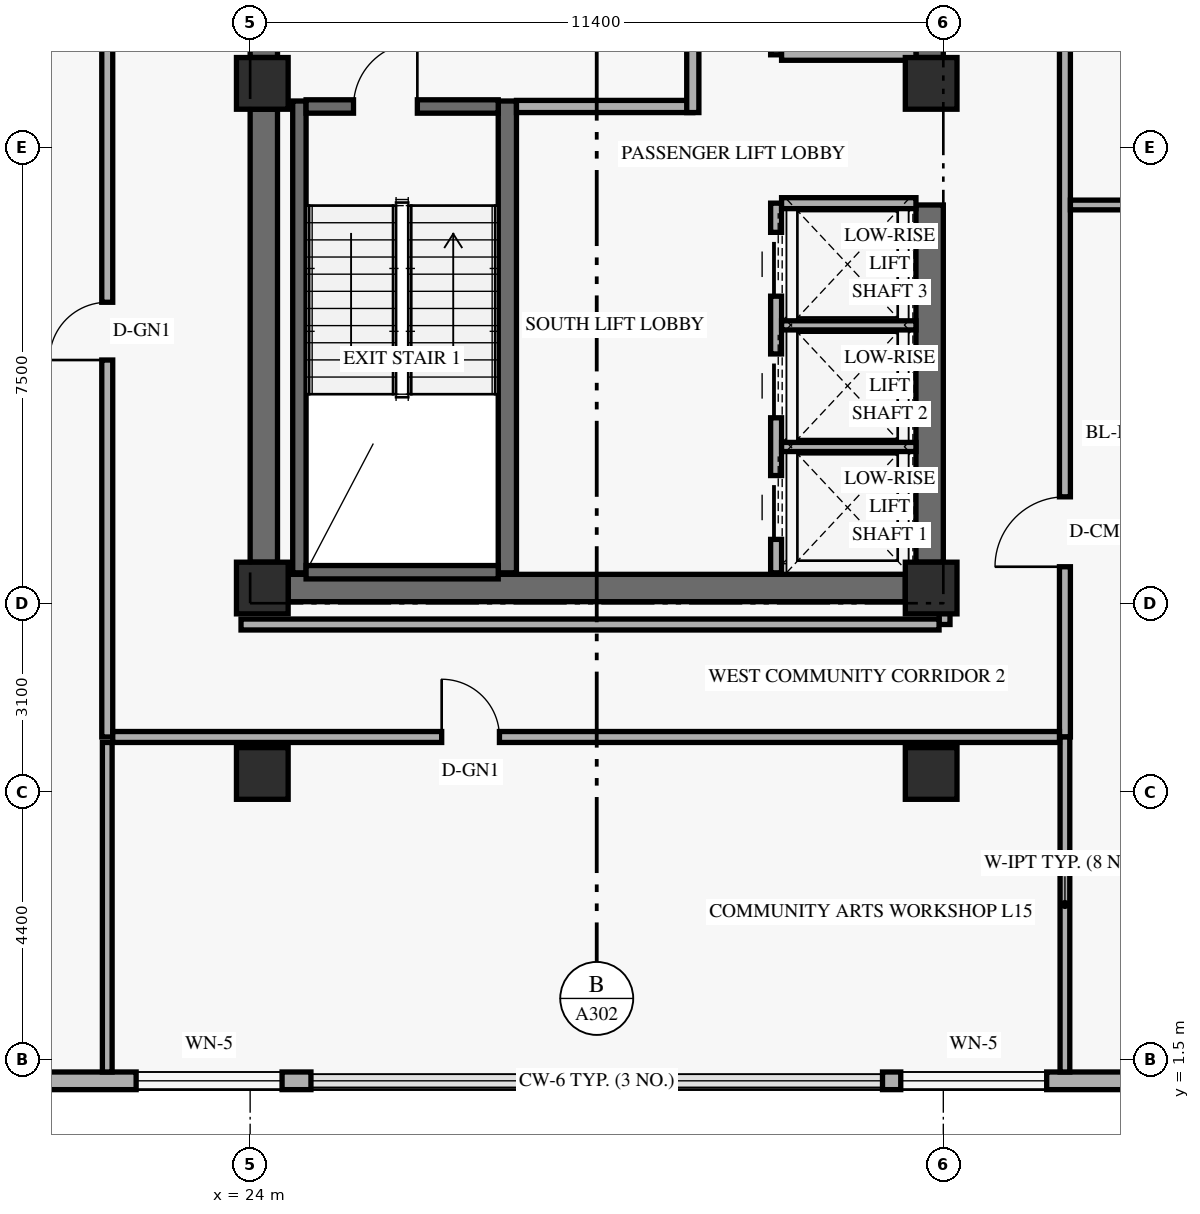
"""IFC4 building model, lengths in metres.
Left out: names, types, materials, properties, quantities, classifications, styles, units other than length and angle.
Written with IfcOpenShell. Run it as: python <this file> out.ifc"""

import sys

from ifc_helpers import new_model, si_unit, direction, frame, frame_2d, origin, origin_2d, place, context, subcontext, project, spatial, rectangle, extrude, element, fill, save


model = new_model("IFC4")
c1 = context("Model", 3, precision=1e-05, world=origin(), true_north=direction((0.0, 1.0)))
c2 = subcontext(c1, "Body", "Model", "MODEL_VIEW")
j1 = project(units=[si_unit("LENGTHUNIT", "METRE"), si_unit("PLANEANGLEUNIT", "RADIAN")], contexts=[c1])
p1 = place(None, origin())
s1 = spatial("IfcSite", under=j1, at=p1, CompositionType="ELEMENT")
p2 = place(p1, origin())
s2 = spatial("IfcBuilding", under=s1, at=p2, CompositionType="ELEMENT")
p3 = place(p2, frame((0.0, 0.0, 60.0)))
s3 = spatial("IfcBuildingStorey", under=s2, at=p3, CompositionType="ELEMENT", Elevation=60.0)
p4 = place(p3, frame((24.225, 9.675, 0.0), z_axis=(0.0, 0.0, 1.0), x_axis=(0.0, 1.0, 0.0)))
e1 = element("IfcWall", 1, at=p4, inside=s3, PredefinedType="SHEAR", context=c2, shape_type="SweptSolid", body=[
    extrude(rectangle(XDim=7.45, YDim=0.45, at=frame_2d((3.725, 0.0))), origin(), (0.0, 0.0, 1.0), 3.267),
])
p5 = place(p3, frame((24.225, 17.975, 0.0), z_axis=(0.0, 0.0, 1.0), x_axis=(0.0, 1.0, 0.0)))
e2 = element("IfcWall", 2, at=p5, inside=s3, PredefinedType="SHEAR", context=c2, shape_type="SweptSolid", body=[
    extrude(rectangle(XDim=11.8, YDim=0.45, at=frame_2d((5.9, 0.0))), origin(), (0.0, 0.0, 1.0), 3.267),
])
p6 = place(p3, frame((35.175, 9.675, 0.0), z_axis=(0.0, 0.0, 1.0), x_axis=(0.0, 1.0, 0.0)))
e3 = element("IfcWall", 3, at=p6, inside=s3, PredefinedType="SHEAR", context=c2, shape_type="SweptSolid", body=[
    extrude(rectangle(XDim=5.875, YDim=0.45, at=frame_2d((2.938, 0.0))), origin(), (0.0, 0.0, 1.0), 3.267),
])
p7 = place(p3, frame((35.175, 17.975, 0.0), z_axis=(0.0, 0.0, 1.0), x_axis=(0.0, 1.0, 0.0)))
e4 = element("IfcWall", 4, at=p7, inside=s3, PredefinedType="SHEAR", context=c2, shape_type="SweptSolid", body=[
    extrude(rectangle(XDim=10.125, YDim=0.45, at=frame_2d((5.062, 0.0))), origin(), (0.0, 0.0, 1.0), 3.267),
])
p8 = place(p3, frame((24.625, 9.25, 0.0), z_axis=(0.0, 0.0, 1.0), x_axis=(1.0, 0.0, 0.0)))
e5 = element("IfcWall", 5, at=p8, inside=s3, PredefinedType="SHEAR", context=c2, shape_type="SweptSolid", body=[
    extrude(rectangle(XDim=10.15, YDim=0.45, at=frame_2d((5.075, 0.0))), origin(), (0.0, 0.0, 1.0), 3.96),
])
p9 = place(p3, frame((24.81, 9.5, 0.0), z_axis=(0.0, 0.0, 1.0), x_axis=(0.0, 1.0, 0.0)))
e6 = element("IfcWall", 6, at=p9, inside=s3, PredefinedType="SHEAR", context=c2, shape_type="SweptSolid", body=[
    extrude(rectangle(XDim=7.76, YDim=0.22, at=frame_2d((3.88, 0.0))), origin(), (0.0, 0.0, 1.0), 3.96),
])
p10 = place(p3, frame((28.23, 9.5, 0.0), z_axis=(0.0, 0.0, 1.0), x_axis=(0.0, 1.0, 0.0)))
e7 = element("IfcWall", 7, at=p10, inside=s3, PredefinedType="SHEAR", context=c2, shape_type="SweptSolid", body=[
    extrude(rectangle(XDim=7.76, YDim=0.3, at=frame_2d((3.88, 0.0))), origin(), (0.0, 0.0, 1.0), 3.96),
])
p11 = place(p3, frame((24.92, 9.51, 0.0), z_axis=(0.0, 0.0, 1.0), x_axis=(1.0, 0.0, 0.0)))
e8 = element("IfcWall", 8, at=p11, inside=s3, PredefinedType="SHEAR", context=c2, shape_type="SweptSolid", body=[
    extrude(rectangle(XDim=3.16, YDim=0.22, at=frame_2d((1.58, 0.0))), origin(), (0.0, 0.0, 1.0), 3.96),
])
p12 = place(p3, frame((24.92, 17.17, 0.0), z_axis=(0.0, 0.0, 1.0), x_axis=(1.0, 0.0, 0.0)))
e9 = element("IfcWall", 9, at=p12, inside=s3, PredefinedType="SHEAR", context=c2, shape_type="SweptSolid", body=[
    extrude(rectangle(XDim=3.16, YDim=0.22, at=frame_2d((1.58, 0.0))), origin(), (0.0, 0.0, 1.0), 3.96),
])
p13 = place(p12, frame((0.78, 0.0, 0.0)))
e10 = element("IfcOpeningElement", 10, at=p13, cuts=e9, PredefinedType="OPENING", context=c2, shape_type="SweptSolid", body=[
    extrude(rectangle(XDim=1.05, YDim=2.15, at=frame_2d((0.525, 1.075))), frame((0.0, 0.12, 0.0), z_axis=(0.0, -1.0, 0.0), x_axis=(1.0, 0.0, 0.0)), (0.0, 0.0, 1.0), 0.24),
])
for number, where, z_axis, x_axis in (
    (11, (24.2, 6.2, 0.0), (0.0, 0.0, 1.0), (1.0, 0.0, 0.0)),
    (12, (24.2, 9.25, 0.0), (0.0, 0.0, 1.0), (1.0, 0.0, 0.0)),
    (13, (24.2, 17.55, 0.0), (0.0, 0.0, 1.0), (1.0, 0.0, 0.0)),
    (14, (35.2, 6.2, 0.0), (0.0, 0.0, 1.0), (1.0, 0.0, 0.0)),
    (15, (35.2, 9.25, 0.0), (0.0, 0.0, 1.0), (1.0, 0.0, 0.0)),
    (16, (35.2, 17.55, 0.0), (0.0, 0.0, 1.0), (1.0, 0.0, 0.0)),
):
    element("IfcColumn", number, at=place(p3, frame(where, z_axis=z_axis, x_axis=x_axis)), inside=s3, PredefinedType="COLUMN", context=c2, shape_type="SweptSolid", body=[
        extrude(rectangle(XDim=0.85, YDim=0.85, at=origin_2d()), origin(), (0.0, 0.0, 1.0), 4.2),
    ])
p14 = place(p3, frame((5.42, 1.145, 0.0), z_axis=(0.0, 0.0, 1.0), x_axis=(1.0, 0.0, 0.0)))
e17 = element("IfcWall", 17, at=p14, inside=s3, PredefinedType="SOLIDWALL", context=c2, shape_type="SweptSolid", body=[
    extrude(rectangle(XDim=19.58, YDim=0.29, at=frame_2d((9.79, 0.0))), origin(), (0.0, 0.0, 1.0), 3.96),
])
p15 = place(p14, frame((6.915, 0.0, 0.85)))
e18 = element("IfcOpeningElement", 18, at=p15, cuts=e17, PredefinedType="OPENING", context=c2, shape_type="SweptSolid", body=[
    extrude(rectangle(XDim=2.4, YDim=1.9, at=frame_2d((1.2, 0.95))), frame((0.0, 0.155, 0.0), z_axis=(0.0, -1.0, 0.0), x_axis=(1.0, 0.0, 0.0)), (0.0, 0.0, 1.0), 0.31),
])
p16 = place(p14, frame((16.705, 0.0, 0.85)))
e19 = element("IfcOpeningElement", 19, at=p16, cuts=e17, PredefinedType="OPENING", context=c2, shape_type="SweptSolid", body=[
    extrude(rectangle(XDim=2.4, YDim=1.9, at=frame_2d((1.2, 0.95))), frame((0.0, 0.155, 0.0), z_axis=(0.0, -1.0, 0.0), x_axis=(1.0, 0.0, 0.0)), (0.0, 0.0, 1.0), 0.31),
])
p17 = place(p3, frame((34.4, 1.145, 0.0), z_axis=(0.0, 0.0, 1.0), x_axis=(1.0, 0.0, 0.0)))
e20 = element("IfcWall", 20, at=p17, inside=s3, PredefinedType="SOLIDWALL", context=c2, shape_type="SweptSolid", body=[
    extrude(rectangle(XDim=10.58, YDim=0.29, at=frame_2d((5.29, 0.0))), origin(), (0.0, 0.0, 1.0), 3.96),
])
p18 = place(p17, frame((0.3, 0.0, 0.85)))
e21 = element("IfcOpeningElement", 21, at=p18, cuts=e20, PredefinedType="OPENING", context=c2, shape_type="SweptSolid", body=[
    extrude(rectangle(XDim=2.4, YDim=1.9, at=frame_2d((1.2, 0.95))), frame((0.0, 0.155, 0.0), z_axis=(0.0, -1.0, 0.0), x_axis=(1.0, 0.0, 0.0)), (0.0, 0.0, 1.0), 0.31),
])
p19 = place(p17, frame((5.59, 0.0, 0.85)))
e22 = element("IfcOpeningElement", 22, at=p19, cuts=e20, PredefinedType="OPENING", context=c2, shape_type="SweptSolid", body=[
    extrude(rectangle(XDim=2.4, YDim=1.9, at=frame_2d((1.2, 0.95))), frame((0.0, 0.155, 0.0), z_axis=(0.0, -1.0, 0.0), x_axis=(1.0, 0.0, 0.0)), (0.0, 0.0, 1.0), 0.31),
])
p20 = place(p3, frame((28.38, 17.17, 0.0), z_axis=(0.0, 0.0, 1.0), x_axis=(1.0, 0.0, 0.0)))
e23 = element("IfcWall", 23, at=p20, inside=s3, PredefinedType="STANDARD", context=c2, shape_type="SweptSolid", body=[
    extrude(rectangle(XDim=2.9, YDim=0.2, at=frame_2d((1.45, 0.0))), origin(), (0.0, 0.0, 1.0), 3.96),
])
p21 = place(p3, frame((31.28, 17.07, 0.0), z_axis=(0.0, 0.0, 1.0), x_axis=(0.0, 1.0, 0.0)))
e24 = element("IfcWall", 24, at=p21, inside=s3, PredefinedType="STANDARD", context=c2, shape_type="SweptSolid", body=[
    extrude(rectangle(XDim=3.92, YDim=0.2, at=frame_2d((1.96, 0.0))), origin(), (0.0, 0.0, 1.0), 3.249),
])
p22 = place(p21, frame((1.35, 0.0, 0.0)))
e25 = element("IfcOpeningElement", 25, at=p22, cuts=e24, PredefinedType="OPENING", context=c2, shape_type="SweptSolid", body=[
    extrude(rectangle(XDim=1.2, YDim=2.15, at=frame_2d((0.6, 1.075))), frame((0.0, 0.11, 0.0), z_axis=(0.0, -1.0, 0.0), x_axis=(1.0, 0.0, 0.0)), (0.0, 0.0, 1.0), 0.22),
])
p23 = place(p3, frame((32.65, 9.5, 0.0), z_axis=(0.0, 0.0, 1.0), x_axis=(0.0, 1.0, 0.0)))
e26 = element("IfcWall", 26, at=p23, inside=s3, PredefinedType="STANDARD", context=c2, shape_type="SweptSolid", body=[
    extrude(rectangle(XDim=6.08, YDim=0.18, at=frame_2d((3.04, 0.0))), origin(), (0.0, 0.0, 1.0), 3.96),
])
p24 = place(p23, frame((0.55, 0.0, 0.0)))
e27 = element("IfcOpeningElement", 27, at=p24, cuts=e26, PredefinedType="OPENING", context=c2, shape_type="SweptSolid", body=[
    extrude(rectangle(XDim=1.05, YDim=2.2, at=frame_2d((0.525, 1.1))), frame((0.0, 0.1, 0.0), z_axis=(0.0, -1.0, 0.0), x_axis=(1.0, 0.0, 0.0)), (0.0, 0.0, 1.0), 0.2),
])
p25 = place(p23, frame((2.55, 0.0, 0.0)))
e28 = element("IfcOpeningElement", 28, at=p25, cuts=e26, PredefinedType="OPENING", context=c2, shape_type="SweptSolid", body=[
    extrude(rectangle(XDim=1.05, YDim=2.2, at=frame_2d((0.525, 1.1))), frame((0.0, 0.1, 0.0), z_axis=(0.0, -1.0, 0.0), x_axis=(1.0, 0.0, 0.0)), (0.0, 0.0, 1.0), 0.2),
])
p26 = place(p23, frame((4.55, 0.0, 0.0)))
e29 = element("IfcOpeningElement", 29, at=p26, cuts=e26, PredefinedType="OPENING", context=c2, shape_type="SweptSolid", body=[
    extrude(rectangle(XDim=1.05, YDim=2.2, at=frame_2d((0.525, 1.1))), frame((0.0, 0.1, 0.0), z_axis=(0.0, -1.0, 0.0), x_axis=(1.0, 0.0, 0.0)), (0.0, 0.0, 1.0), 0.2),
])
p27 = place(p3, frame((32.74, 15.58, 0.0), z_axis=(0.0, 0.0, 1.0), x_axis=(1.0, 0.0, 0.0)))
e30 = element("IfcWall", 30, at=p27, inside=s3, PredefinedType="STANDARD", context=c2, shape_type="SweptSolid", body=[
    extrude(rectangle(XDim=2.21, YDim=0.18, at=frame_2d((1.105, 0.0))), origin(), (0.0, 0.0, 1.0), 3.96),
])
for number, where, z_axis, x_axis in (
    (31, (32.74, 11.57, 0.0), (0.0, 0.0, 1.0), (1.0, 0.0, 0.0)),
    (32, (32.74, 13.57, 0.0), (0.0, 0.0, 1.0), (1.0, 0.0, 0.0)),
):
    element("IfcWall", number, at=place(p3, frame(where, z_axis=z_axis, x_axis=x_axis)), inside=s3, PredefinedType="STANDARD", context=c2, shape_type="SweptSolid", body=[
        extrude(rectangle(XDim=2.21, YDim=0.15, at=frame_2d((1.105, 0.0))), origin(), (0.0, 0.0, 1.0), 3.96),
    ])
p28 = place(p3, frame((32.65, 18.02, 0.0), z_axis=(0.0, 0.0, 1.0), x_axis=(0.0, 1.0, 0.0)))
e33 = element("IfcWall", 33, at=p28, inside=s3, PredefinedType="STANDARD", context=c2, shape_type="SweptSolid", body=[
    extrude(rectangle(XDim=10.06, YDim=0.18, at=frame_2d((5.03, 0.0))), origin(), (0.0, 0.0, 1.0), 3.96),
])
p29 = place(p3, frame((32.74, 18.02, 0.0), z_axis=(0.0, 0.0, 1.0), x_axis=(1.0, 0.0, 0.0)))
e34 = element("IfcWall", 34, at=p29, inside=s3, PredefinedType="STANDARD", context=c2, shape_type="SweptSolid", body=[
    extrude(rectangle(XDim=2.21, YDim=0.18, at=frame_2d((1.105, 0.0))), origin(), (0.0, 0.0, 1.0), 3.96),
])
p30 = place(p3, frame((37.4, 6.8, 0.0), z_axis=(0.0, 0.0, 1.0), x_axis=(0.0, 1.0, 0.0)))
e35 = element("IfcWall", 35, at=p30, inside=s3, PredefinedType="STANDARD", context=c2, shape_type="SweptSolid", body=[
    extrude(rectangle(XDim=34.4, YDim=0.18, at=frame_2d((17.2, 0.0))), origin(), (0.0, 0.0, 1.0), 3.249),
])
p31 = place(p30, frame((25.71, 0.0, 0.0)))
e36 = element("IfcOpeningElement", 36, at=p31, cuts=e35, PredefinedType="OPENING", context=c2, shape_type="SweptSolid", body=[
    extrude(rectangle(XDim=0.92, YDim=2.14, at=frame_2d((0.46, 1.07))), frame((0.0, 0.1, 0.0), z_axis=(0.0, -1.0, 0.0), x_axis=(1.0, 0.0, 0.0)), (0.0, 0.0, 1.0), 0.2),
])
p32 = place(p30, frame((33.19, 0.0, 0.0)))
e37 = element("IfcOpeningElement", 37, at=p32, cuts=e35, PredefinedType="OPENING", context=c2, shape_type="SweptSolid", body=[
    extrude(rectangle(XDim=0.95, YDim=2.14, at=frame_2d((0.475, 1.07))), frame((0.0, 0.1, 0.0), z_axis=(0.0, -1.0, 0.0), x_axis=(1.0, 0.0, 0.0)), (0.0, 0.0, 1.0), 0.2),
])
p33 = place(p30, frame((2.8, 0.0, 0.0)))
e38 = element("IfcOpeningElement", 38, at=p33, cuts=e35, PredefinedType="OPENING", context=c2, shape_type="SweptSolid", body=[
    extrude(rectangle(XDim=1.15, YDim=2.15, at=frame_2d((0.575, 1.075))), frame((0.0, 0.1, 0.0), z_axis=(0.0, -1.0, 0.0), x_axis=(1.0, 0.0, 0.0)), (0.0, 0.0, 1.0), 0.2),
])
p34 = place(p30, frame((21.6, 0.0, 0.0)))
e39 = element("IfcOpeningElement", 39, at=p34, cuts=e35, PredefinedType="OPENING", context=c2, shape_type="SweptSolid", body=[
    extrude(rectangle(XDim=1.15, YDim=2.15, at=frame_2d((0.575, 1.075))), frame((0.0, 0.1, 0.0), z_axis=(0.0, -1.0, 0.0), x_axis=(1.0, 0.0, 0.0)), (0.0, 0.0, 1.0), 0.2),
])
p35 = place(p3, frame((37.4, 1.29, 0.0), z_axis=(0.0, 0.0, 1.0), x_axis=(0.0, 1.0, 0.0)))
e40 = element("IfcWall", 40, at=p35, inside=s3, PredefinedType="PARTITIONING", context=c2, shape_type="SweptSolid", body=[
    extrude(rectangle(XDim=5.51, YDim=0.16, at=frame_2d((2.755, 0.0))), origin(), (0.0, 0.0, 1.0), 3.409),
])
p36 = place(p3, frame((35.42, 8.65, 0.0), z_axis=(0.0, 0.0, 1.0), x_axis=(0.0, 1.0, 0.0)))
e41 = element("IfcWall", 41, at=p36, inside=s3, PredefinedType="STANDARD", context=c2, shape_type="SweptSolid", body=[
    extrude(rectangle(XDim=0.6, YDim=0.18, at=frame_2d((0.3, 0.0))), origin(), (0.0, 0.0, 1.0), 3.249),
])
p37 = place(p3, frame((37.49, 15.55, 0.0), z_axis=(0.0, 0.0, 1.0), x_axis=(1.0, 0.0, 0.0)))
e42 = element("IfcWall", 42, at=p37, inside=s3, PredefinedType="PARTITIONING", context=c2, shape_type="SweptSolid", body=[
    extrude(rectangle(XDim=10.82, YDim=0.16, at=frame_2d((5.41, 0.0))), origin(), (0.0, 0.0, 1.0), 3.249),
])
p38 = place(p3, frame((21.65, 6.8, 0.0), z_axis=(0.0, 0.0, 1.0), x_axis=(0.0, 1.0, 0.0)))
e43 = element("IfcWall", 43, at=p38, inside=s3, PredefinedType="STANDARD", context=c2, shape_type="SweptSolid", body=[
    extrude(rectangle(XDim=34.4, YDim=0.18, at=frame_2d((17.2, 0.0))), origin(), (0.0, 0.0, 1.0), 3.249),
])
p39 = place(p38, frame((15.2, 0.0, 0.0)))
e44 = element("IfcOpeningElement", 44, at=p39, cuts=e43, PredefinedType="OPENING", context=c2, shape_type="SweptSolid", body=[
    extrude(rectangle(XDim=0.95, YDim=2.15, at=frame_2d((0.475, 1.075))), frame((0.0, 0.1, 0.0), z_axis=(0.0, -1.0, 0.0), x_axis=(1.0, 0.0, 0.0)), (0.0, 0.0, 1.0), 0.2),
])
p40 = place(p38, frame((6.2, 0.0, 0.0)))
e45 = element("IfcOpeningElement", 45, at=p40, cuts=e43, PredefinedType="OPENING", context=c2, shape_type="SweptSolid", body=[
    extrude(rectangle(XDim=0.95, YDim=2.15, at=frame_2d((0.475, 1.075))), frame((0.0, 0.1, 0.0), z_axis=(0.0, -1.0, 0.0), x_axis=(1.0, 0.0, 0.0)), (0.0, 0.0, 1.0), 0.2),
])
p41 = place(p38, frame((26.5, 0.0, 0.0)))
e46 = element("IfcOpeningElement", 46, at=p41, cuts=e43, PredefinedType="OPENING", context=c2, shape_type="SweptSolid", body=[
    extrude(rectangle(XDim=0.95, YDim=2.15, at=frame_2d((0.475, 1.075))), frame((0.0, 0.1, 0.0), z_axis=(0.0, -1.0, 0.0), x_axis=(1.0, 0.0, 0.0)), (0.0, 0.0, 1.0), 0.2),
])
p42 = place(p3, frame((21.74, 6.8, 0.0), z_axis=(0.0, 0.0, 1.0), x_axis=(1.0, 0.0, 0.0)))
e47 = element("IfcWall", 47, at=p42, inside=s3, PredefinedType="STANDARD", context=c2, shape_type="SweptSolid", body=[
    extrude(rectangle(XDim=15.57, YDim=0.18, at=frame_2d((7.785, 0.0))), origin(), (0.0, 0.0, 1.0), 3.249),
])
p43 = place(p42, frame((5.41, 0.0, 0.0)))
e48 = element("IfcOpeningElement", 48, at=p43, cuts=e47, PredefinedType="OPENING", context=c2, shape_type="SweptSolid", body=[
    extrude(rectangle(XDim=0.95, YDim=2.15, at=frame_2d((0.475, 1.075))), frame((0.0, 0.1, 0.0), z_axis=(0.0, -1.0, 0.0), x_axis=(1.0, 0.0, 0.0)), (0.0, 0.0, 1.0), 0.2),
])
p44 = place(p3, frame((23.85, 8.65, 0.0), z_axis=(0.0, 0.0, 1.0), x_axis=(1.0, 0.0, 0.0)))
e49 = element("IfcWall", 49, at=p44, inside=s3, PredefinedType="STANDARD", context=c2, shape_type="SweptSolid", body=[
    extrude(rectangle(XDim=11.48, YDim=0.18, at=frame_2d((5.74, 0.0))), origin(), (0.0, 0.0, 1.0), 3.249),
])
p45 = place(p3, frame((21.65, 1.29, 0.0), z_axis=(0.0, 0.0, 1.0), x_axis=(0.0, 1.0, 0.0)))
e50 = element("IfcWall", 50, at=p45, inside=s3, PredefinedType="PARTITIONING", context=c2, shape_type="SweptSolid", body=[
    extrude(rectangle(XDim=5.42, YDim=0.16, at=frame_2d((2.71, 0.0))), origin(), (0.0, 0.0, 1.0), 3.409),
])
p46 = place(p16, origin())
e51 = element("IfcWindow", 51, at=p46, inside=s3, PartitioningType="SINGLE_PANEL", PredefinedType="WINDOW", context=c2, shape_type="SweptSolid", body=[
    extrude(rectangle(XDim=2.4, YDim=1.9, at=frame_2d((1.2, 0.95))), frame((0.0, 0.03, 0.0), z_axis=(0.0, -1.0, 0.0), x_axis=(1.0, 0.0, 0.0)), (0.0, 0.0, 1.0), 0.06),
])
fill(e19, e51)
p47 = place(p18, origin())
e52 = element("IfcWindow", 52, at=p47, inside=s3, PartitioningType="SINGLE_PANEL", PredefinedType="WINDOW", context=c2, shape_type="SweptSolid", body=[
    extrude(rectangle(XDim=2.4, YDim=1.9, at=frame_2d((1.2, 0.95))), frame((0.0, 0.03, 0.0), z_axis=(0.0, -1.0, 0.0), x_axis=(1.0, 0.0, 0.0)), (0.0, 0.0, 1.0), 0.06),
])
fill(e21, e52)
p48 = place(p13, frame((1.05, 0.0, 0.0), z_axis=(0.0, 0.0, 1.0), x_axis=(-1.0, 0.0, 0.0)))
e53 = element("IfcDoor", 53, at=p48, inside=s3, OperationType="SINGLE_SWING_LEFT", PredefinedType="DOOR", context=c2, shape_type="SweptSolid", body=[
    extrude(rectangle(XDim=1.05, YDim=2.15, at=frame_2d((0.525, 1.075))), frame((0.0, 0.025, 0.0), z_axis=(0.0, -1.0, 0.0), x_axis=(1.0, 0.0, 0.0)), (0.0, 0.0, 1.0), 0.05),
])
fill(e10, e53)
p49 = place(p24, origin())
e54 = element("IfcDoor", 54, at=p49, inside=s3, OperationType="SLIDING_TO_LEFT", PredefinedType="DOOR", context=c2, shape_type="SweptSolid", body=[
    extrude(rectangle(XDim=1.05, YDim=2.2, at=frame_2d((0.525, 1.1))), frame((0.0, 0.025, 0.0), z_axis=(0.0, -1.0, 0.0), x_axis=(1.0, 0.0, 0.0)), (0.0, 0.0, 1.0), 0.05),
])
fill(e27, e54)
p50 = place(p25, origin())
e55 = element("IfcDoor", 55, at=p50, inside=s3, OperationType="SLIDING_TO_LEFT", PredefinedType="DOOR", context=c2, shape_type="SweptSolid", body=[
    extrude(rectangle(XDim=1.05, YDim=2.2, at=frame_2d((0.525, 1.1))), frame((0.0, 0.025, 0.0), z_axis=(0.0, -1.0, 0.0), x_axis=(1.0, 0.0, 0.0)), (0.0, 0.0, 1.0), 0.05),
])
fill(e28, e55)
p51 = place(p26, origin())
e56 = element("IfcDoor", 56, at=p51, inside=s3, OperationType="SLIDING_TO_LEFT", PredefinedType="DOOR", context=c2, shape_type="SweptSolid", body=[
    extrude(rectangle(XDim=1.05, YDim=2.2, at=frame_2d((0.525, 1.1))), frame((0.0, 0.025, 0.0), z_axis=(0.0, -1.0, 0.0), x_axis=(1.0, 0.0, 0.0)), (0.0, 0.0, 1.0), 0.05),
])
fill(e29, e56)
p52 = place(p33, origin())
e57 = element("IfcDoor", 57, at=p52, inside=s3, OperationType="SINGLE_SWING_LEFT", PredefinedType="DOOR", context=c2, shape_type="SweptSolid", body=[
    extrude(rectangle(XDim=1.15, YDim=2.15, at=frame_2d((0.575, 1.075))), frame((0.0, 0.025, 0.0), z_axis=(0.0, -1.0, 0.0), x_axis=(1.0, 0.0, 0.0)), (0.0, 0.0, 1.0), 0.05),
])
fill(e38, e57)
p53 = place(p40, origin())
e58 = element("IfcDoor", 58, at=p53, inside=s3, OperationType="SINGLE_SWING_LEFT", PredefinedType="DOOR", context=c2, shape_type="SweptSolid", body=[
    extrude(rectangle(XDim=0.95, YDim=2.15, at=frame_2d((0.475, 1.075))), frame((0.0, 0.025, 0.0), z_axis=(0.0, -1.0, 0.0), x_axis=(1.0, 0.0, 0.0)), (0.0, 0.0, 1.0), 0.05),
])
fill(e45, e58)
p54 = place(p43, origin())
e59 = element("IfcDoor", 59, at=p54, inside=s3, OperationType="SINGLE_SWING_LEFT", PredefinedType="DOOR", context=c2, shape_type="SweptSolid", body=[
    extrude(rectangle(XDim=0.95, YDim=2.15, at=frame_2d((0.475, 1.075))), frame((0.0, 0.025, 0.0), z_axis=(0.0, -1.0, 0.0), x_axis=(1.0, 0.0, 0.0)), (0.0, 0.0, 1.0), 0.05),
])
fill(e48, e59)
save(model, sys.argv[1])
